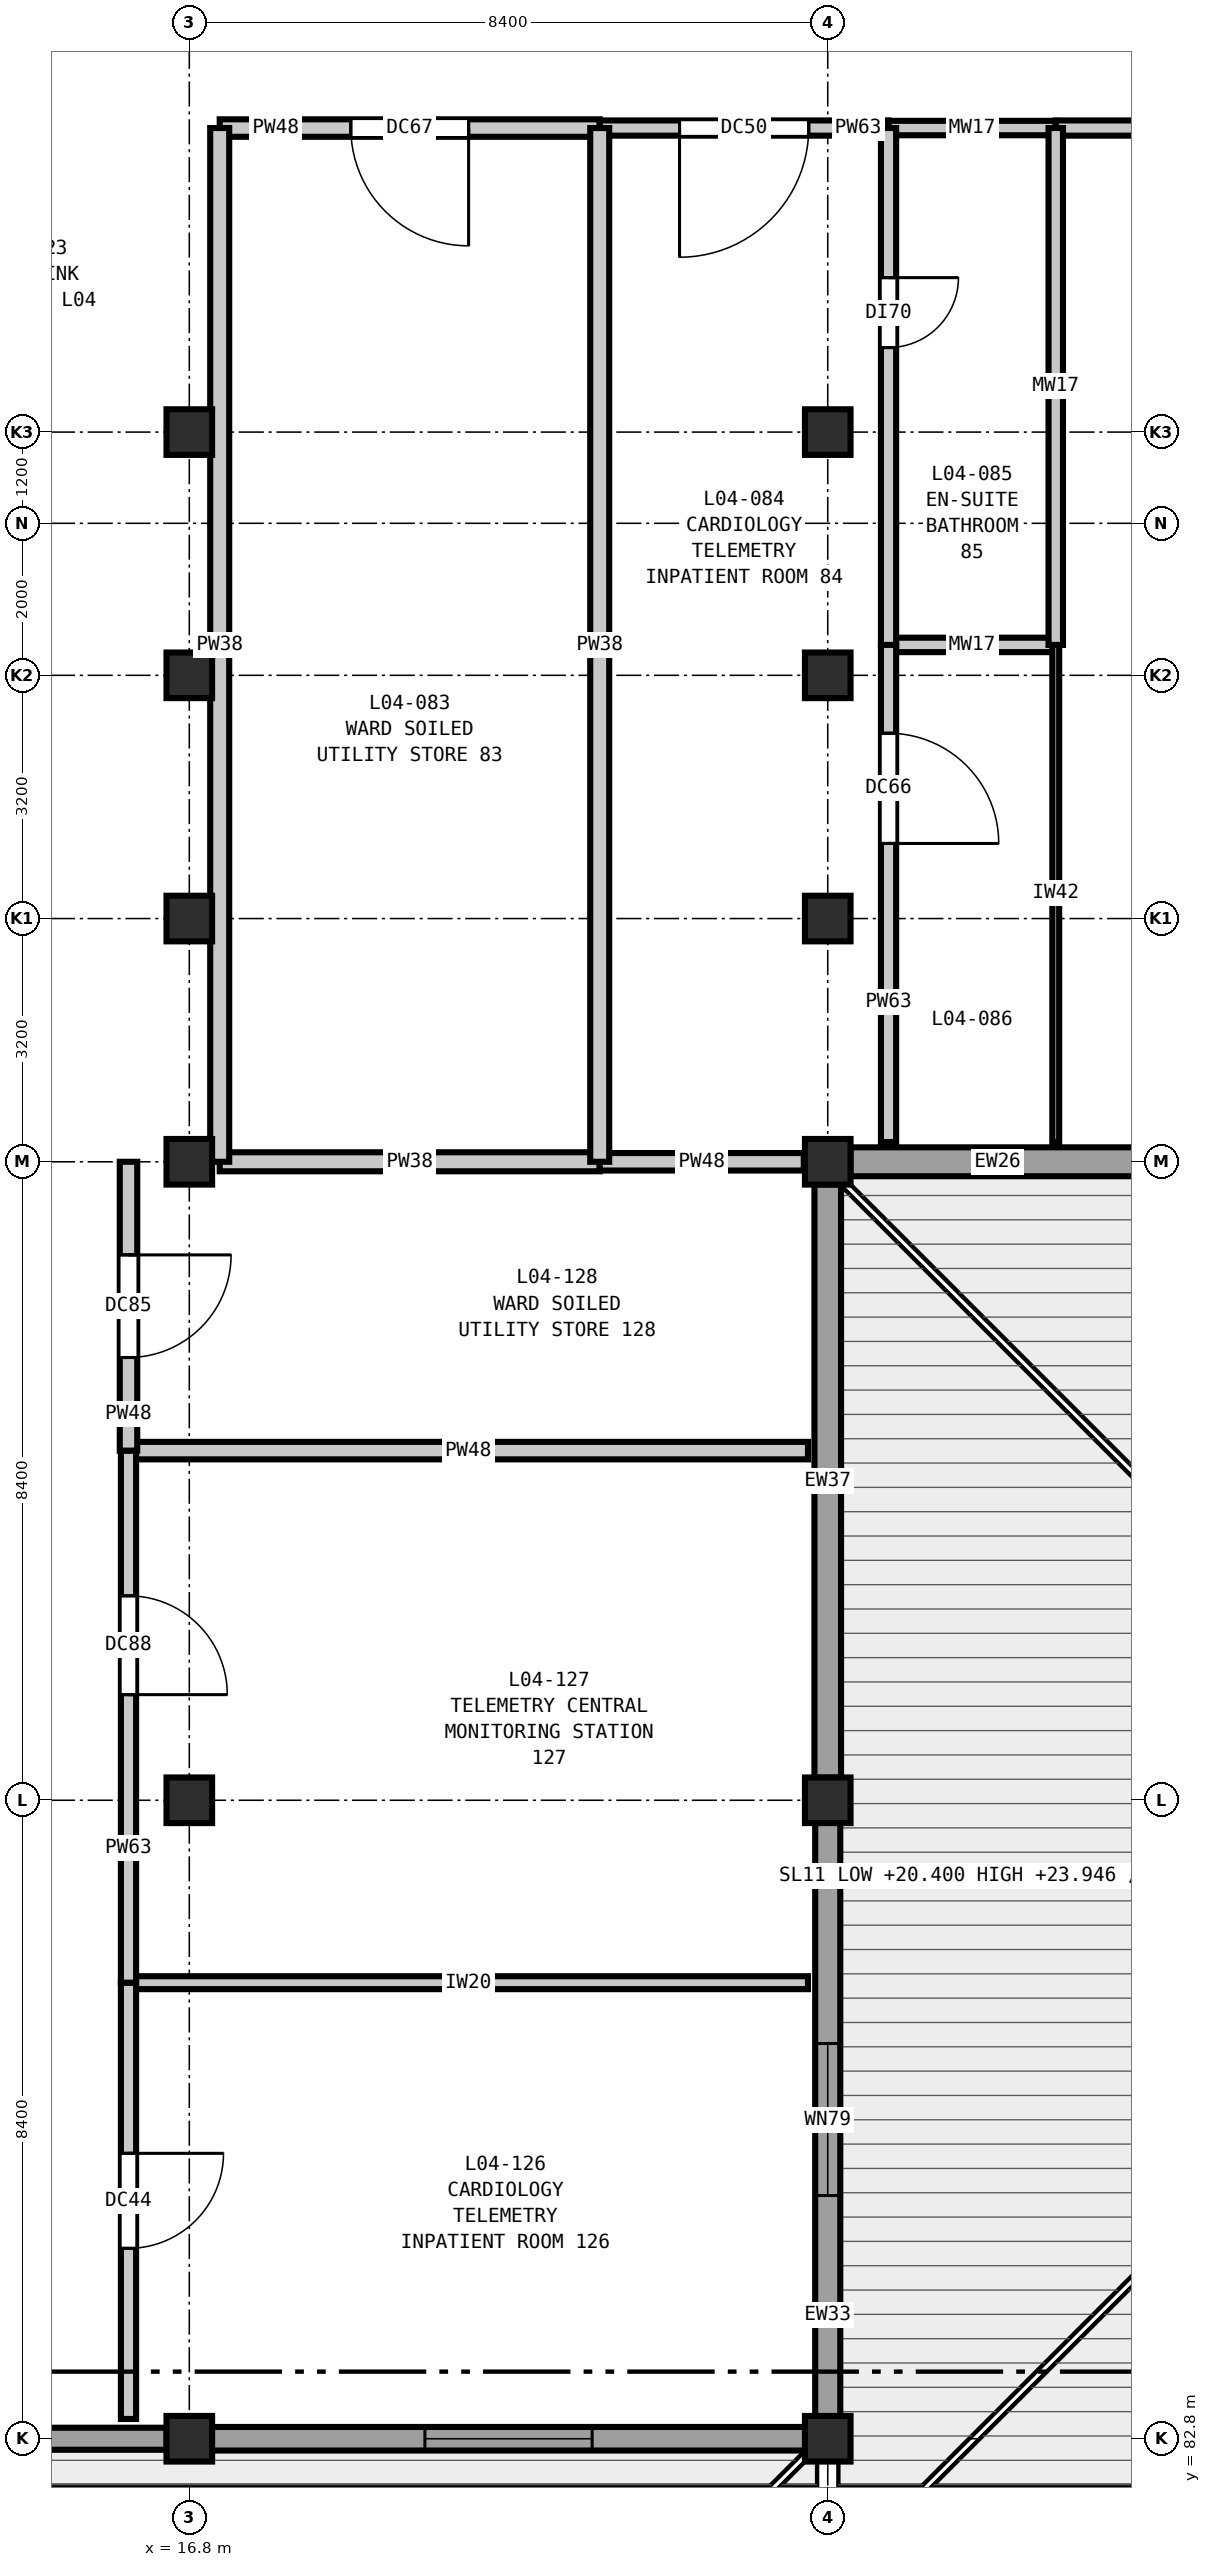
"""IFC4 building model, lengths in metres.
Left out: names, types, materials, properties, quantities, classifications, styles, units other than length and angle.
Written with IfcOpenShell. Run it as: python <this file> out.ifc"""

import sys

from ifc_helpers import new_model, si_unit, direction, frame, frame_2d, origin, origin_2d, place, context, subcontext, project, spatial, rectangle, extrude, element, fill, save


model = new_model("IFC4")
c1 = context("Model", 3, precision=1e-05, world=origin(), true_north=direction((0.0, 1.0)))
c2 = subcontext(c1, "Body", "Model", "MODEL_VIEW")
j1 = project(units=[si_unit("LENGTHUNIT", "METRE"), si_unit("PLANEANGLEUNIT", "RADIAN")], contexts=[c1])
p1 = place(None, origin())
s1 = spatial("IfcSite", under=j1, at=p1, CompositionType="ELEMENT")
p2 = place(p1, origin())
s2 = spatial("IfcBuilding", under=s1, at=p2, CompositionType="ELEMENT")
p3 = place(p2, frame((0.0, 0.0, 20.4)))
s3 = spatial("IfcBuildingStorey", under=s2, at=p3, CompositionType="ELEMENT", Elevation=20.4)
for number, where, z_axis, x_axis in (
    (1, (16.8, 82.8, 0.0), (0.0, 0.0, 1.0), (1.0, 0.0, 0.0)),
    (2, (16.8, 91.2, 0.0), (0.0, 0.0, 1.0), (1.0, 0.0, 0.0)),
    (3, (16.8, 99.6, 0.0), (0.0, 0.0, 1.0), (1.0, 0.0, 0.0)),
    (4, (16.8, 102.8, 0.0), (0.0, 0.0, 1.0), (1.0, 0.0, 0.0)),
    (5, (16.8, 106.0, 0.0), (0.0, 0.0, 1.0), (1.0, 0.0, 0.0)),
    (6, (16.8, 109.2, 0.0), (0.0, 0.0, 1.0), (1.0, 0.0, 0.0)),
    (7, (25.2, 82.8, 0.0), (0.0, 0.0, 1.0), (1.0, 0.0, 0.0)),
    (8, (25.2, 91.2, 0.0), (0.0, 0.0, 1.0), (1.0, 0.0, 0.0)),
    (9, (25.2, 99.6, 0.0), (0.0, 0.0, 1.0), (1.0, 0.0, 0.0)),
    (10, (25.2, 102.8, 0.0), (0.0, 0.0, 1.0), (1.0, 0.0, 0.0)),
    (11, (25.2, 106.0, 0.0), (0.0, 0.0, 1.0), (1.0, 0.0, 0.0)),
    (12, (25.2, 109.2, 0.0), (0.0, 0.0, 1.0), (1.0, 0.0, 0.0)),
):
    element("IfcColumn", number, at=place(p3, frame(where, z_axis=z_axis, x_axis=x_axis)), inside=s3, PredefinedType="COLUMN", context=c2, shape_type="SweptSolid", body=[
        extrude(rectangle(XDim=0.6, YDim=0.6, at=origin_2d()), origin(), (0.0, 0.0, 1.0), 4.2),
    ])
p4 = place(p3, frame((33.302, 99.6, 0.0), z_axis=(0.0, 0.0, 1.0), x_axis=(-1.0, 0.0, 0.0)))
e13 = element("IfcWall", 13, at=p4, inside=s3, PredefinedType="SOLIDWALL", context=c2, shape_type="SweptSolid", body=[
    extrude(rectangle(XDim=7.804, YDim=0.38, at=frame_2d((3.902, 0.0))), origin(), (0.0, 0.0, 1.0), 3.48),
])
p5 = place(p4, frame((1.879, 0.0, 0.9)))
e14 = element("IfcOpeningElement", 14, at=p5, cuts=e13, PredefinedType="OPENING", context=c2, shape_type="SweptSolid", body=[
    extrude(rectangle(XDim=1.8, YDim=1.95, at=frame_2d((0.9, 0.975))), frame((0.0, 0.2, 0.0), z_axis=(0.0, -1.0, 0.0), x_axis=(1.0, 0.0, 0.0)), (0.0, 0.0, 1.0), 0.4),
])
p6 = place(p3, frame((25.2, 99.302, 0.0), z_axis=(0.0, 0.0, 1.0), x_axis=(0.0, -1.0, 0.0)))
e15 = element("IfcWall", 15, at=p6, inside=s3, PredefinedType="SOLIDWALL", context=c2, shape_type="SweptSolid", body=[
    extrude(rectangle(XDim=7.804, YDim=0.35, at=frame_2d((3.902, 0.0))), origin(), (0.0, 0.0, 1.0), 3.48),
])
p7 = place(p3, frame((25.2, 90.902, 0.0), z_axis=(0.0, 0.0, 1.0), x_axis=(0.0, -1.0, 0.0)))
e16 = element("IfcWall", 16, at=p7, inside=s3, PredefinedType="SOLIDWALL", context=c2, shape_type="SweptSolid", body=[
    extrude(rectangle(XDim=7.804, YDim=0.33, at=frame_2d((3.902, 0.0))), origin(), (0.0, 0.0, 1.0), 3.48),
])
p8 = place(p7, frame((2.902, 0.0, 0.9)))
e17 = element("IfcOpeningElement", 17, at=p8, cuts=e16, PredefinedType="OPENING", context=c2, shape_type="SweptSolid", body=[
    extrude(rectangle(XDim=2.0, YDim=1.95, at=frame_2d((1.0, 0.975))), frame((0.0, 0.175, 0.0), z_axis=(0.0, -1.0, 0.0), x_axis=(1.0, 0.0, 0.0)), (0.0, 0.0, 1.0), 0.35),
])
p9 = place(p3, frame((24.902, 82.8, 0.0), z_axis=(0.0, 0.0, 1.0), x_axis=(-1.0, 0.0, 0.0)))
e18 = element("IfcWall", 18, at=p9, inside=s3, PredefinedType="SOLIDWALL", context=c2, shape_type="SweptSolid", body=[
    extrude(rectangle(XDim=7.804, YDim=0.31, at=frame_2d((3.902, 0.0))), origin(), (0.0, 0.0, 1.0), 3.48),
])
p10 = place(p9, frame((2.802, 0.0, 0.9)))
e19 = element("IfcOpeningElement", 19, at=p10, cuts=e18, PredefinedType="OPENING", context=c2, shape_type="SweptSolid", body=[
    extrude(rectangle(XDim=2.2, YDim=1.95, at=frame_2d((1.1, 0.975))), frame((0.0, 0.165, 0.0), z_axis=(0.0, -1.0, 0.0), x_axis=(1.0, 0.0, 0.0)), (0.0, 0.0, 1.0), 0.33),
])
p11 = place(p3, frame((16.502, 82.8, 0.0), z_axis=(0.0, 0.0, 1.0), x_axis=(-1.0, 0.0, 0.0)))
e20 = element("IfcWall", 20, at=p11, inside=s3, PredefinedType="SOLIDWALL", context=c2, shape_type="SweptSolid", body=[
    extrude(rectangle(XDim=7.804, YDim=0.29, at=frame_2d((3.902, 0.0))), origin(), (0.0, 0.0, 1.0), 3.48),
])
p12 = place(p3, frame((16.0, 88.8, 0.0), z_axis=(0.0, 0.0, 1.0), x_axis=(1.0, 0.0, 0.0)))
e21 = element("IfcWall", 21, at=p12, inside=s3, PredefinedType="PARTITIONING", context=c2, shape_type="SweptSolid", body=[
    extrude(rectangle(XDim=8.94, YDim=0.17, at=frame_2d((4.47, 0.0))), origin(), (0.0, 0.0, 1.0), 3.82),
])
p13 = place(p3, frame((16.0, 95.8, 0.0), z_axis=(0.0, 0.0, 1.0), x_axis=(1.0, 0.0, 0.0)))
e22 = element("IfcWall", 22, at=p13, inside=s3, PredefinedType="PARTITIONING", context=c2, shape_type="SweptSolid", body=[
    extrude(rectangle(XDim=8.94, YDim=0.23, at=frame_2d((4.47, 0.0))), origin(), (0.0, 0.0, 1.0), 3.82),
])
p14 = place(p3, frame((17.2, 99.6, 0.0), z_axis=(0.0, 0.0, 1.0), x_axis=(1.0, 0.0, 0.0)))
e23 = element("IfcWall", 23, at=p14, inside=s3, PredefinedType="PARTITIONING", context=c2, shape_type="SweptSolid", body=[
    extrude(rectangle(XDim=5.0, YDim=0.25, at=frame_2d((2.5, 0.0))), origin(), (0.0, 0.0, 1.0), 3.585),
])
p15 = place(p3, frame((22.2, 99.6, 0.0), z_axis=(0.0, 0.0, 1.0), x_axis=(1.0, 0.0, 0.0)))
e24 = element("IfcWall", 24, at=p15, inside=s3, PredefinedType="PARTITIONING", context=c2, shape_type="SweptSolid", body=[
    extrude(rectangle(XDim=2.685, YDim=0.23, at=frame_2d((1.343, 0.0))), origin(), (0.0, 0.0, 1.0), 3.585),
])
p16 = place(p3, frame((26.0, 106.4, 0.0), z_axis=(0.0, 0.0, 1.0), x_axis=(1.0, 0.0, 0.0)))
e25 = element("IfcWall", 25, at=p16, inside=s3, PredefinedType="PLUMBINGWALL", context=c2, shape_type="SweptSolid", body=[
    extrude(rectangle(XDim=2.2, YDim=0.19, at=frame_2d((1.1, 0.0))), origin(), (0.0, 0.0, 1.0), 3.82),
])
p17 = place(p3, frame((17.2, 113.2, 0.0), z_axis=(0.0, 0.0, 1.0), x_axis=(1.0, 0.0, 0.0)))
e26 = element("IfcWall", 26, at=p17, inside=s3, PredefinedType="PARTITIONING", context=c2, shape_type="SweptSolid", body=[
    extrude(rectangle(XDim=5.0, YDim=0.23, at=frame_2d((2.5, 0.0))), origin(), (0.0, 0.0, 1.0), 3.82),
])
p18 = place(p17, frame((1.725, 0.0, 0.0)))
e27 = element("IfcOpeningElement", 27, at=p18, cuts=e26, PredefinedType="OPENING", context=c2, shape_type="SweptSolid", body=[
    extrude(rectangle(XDim=1.55, YDim=2.25, at=frame_2d((0.775, 1.125))), frame((0.0, 0.125, 0.0), z_axis=(0.0, -1.0, 0.0), x_axis=(1.0, 0.0, 0.0)), (0.0, 0.0, 1.0), 0.25),
])
p19 = place(p3, frame((22.2, 113.2, 0.0), z_axis=(0.0, 0.0, 1.0), x_axis=(1.0, 0.0, 0.0)))
e28 = element("IfcWall", 28, at=p19, inside=s3, PredefinedType="PARTITIONING", context=c2, shape_type="SweptSolid", body=[
    extrude(rectangle(XDim=3.8, YDim=0.2, at=frame_2d((1.9, 0.0))), origin(), (0.0, 0.0, 1.0), 3.82),
])
p20 = place(p19, frame((1.05, 0.0, 0.0)))
e29 = element("IfcOpeningElement", 29, at=p20, cuts=e28, PredefinedType="OPENING", context=c2, shape_type="SweptSolid", body=[
    extrude(rectangle(XDim=1.7, YDim=2.3, at=frame_2d((0.85, 1.15))), frame((0.0, 0.11, 0.0), z_axis=(0.0, -1.0, 0.0), x_axis=(1.0, 0.0, 0.0)), (0.0, 0.0, 1.0), 0.22),
])
p21 = place(p3, frame((26.0, 113.2, 0.0), z_axis=(0.0, 0.0, 1.0), x_axis=(1.0, 0.0, 0.0)))
e30 = element("IfcWall", 30, at=p21, inside=s3, PredefinedType="PLUMBINGWALL", context=c2, shape_type="SweptSolid", body=[
    extrude(rectangle(XDim=2.2, YDim=0.19, at=frame_2d((1.1, 0.0))), origin(), (0.0, 0.0, 1.0), 3.82),
])
p22 = place(p3, frame((28.2, 113.2, 0.0), z_axis=(0.0, 0.0, 1.0), x_axis=(1.0, 0.0, 0.0)))
e31 = element("IfcWall", 31, at=p22, inside=s3, PredefinedType="PARTITIONING", context=c2, shape_type="SweptSolid", body=[
    extrude(rectangle(XDim=7.0, YDim=0.2, at=frame_2d((3.5, 0.0))), origin(), (0.0, 0.0, 1.0), 3.82),
])
p23 = place(p22, frame((2.575, 0.0, 0.0)))
e32 = element("IfcOpeningElement", 32, at=p23, cuts=e31, PredefinedType="OPENING", context=c2, shape_type="SweptSolid", body=[
    extrude(rectangle(XDim=1.85, YDim=2.3, at=frame_2d((0.925, 1.15))), frame((0.0, 0.11, 0.0), z_axis=(0.0, -1.0, 0.0), x_axis=(1.0, 0.0, 0.0)), (0.0, 0.0, 1.0), 0.22),
])
p24 = place(p3, frame((16.0, 83.06, 0.0), z_axis=(0.0, 0.0, 1.0), x_axis=(0.0, 1.0, 0.0)))
e33 = element("IfcWall", 33, at=p24, inside=s3, PredefinedType="PARTITIONING", context=c2, shape_type="SweptSolid", body=[
    extrude(rectangle(XDim=5.74, YDim=0.2, at=frame_2d((2.87, 0.0))), origin(), (0.0, 0.0, 1.0), 3.82),
])
p25 = place(p24, frame((2.245, 0.0, 0.0)))
e34 = element("IfcOpeningElement", 34, at=p25, cuts=e33, PredefinedType="OPENING", context=c2, shape_type="SweptSolid", body=[
    extrude(rectangle(XDim=1.25, YDim=2.15, at=frame_2d((0.625, 1.075))), frame((0.0, 0.11, 0.0), z_axis=(0.0, -1.0, 0.0), x_axis=(1.0, 0.0, 0.0)), (0.0, 0.0, 1.0), 0.22),
])
p26 = place(p3, frame((16.0, 88.8, 0.0), z_axis=(0.0, 0.0, 1.0), x_axis=(0.0, 1.0, 0.0)))
e35 = element("IfcWall", 35, at=p26, inside=s3, PredefinedType="PARTITIONING", context=c2, shape_type="SweptSolid", body=[
    extrude(rectangle(XDim=7.0, YDim=0.2, at=frame_2d((3.5, 0.0))), origin(), (0.0, 0.0, 1.0), 3.82),
])
p27 = place(p26, frame((3.79, 0.0, 0.0)))
e36 = element("IfcOpeningElement", 36, at=p27, cuts=e35, PredefinedType="OPENING", context=c2, shape_type="SweptSolid", body=[
    extrude(rectangle(XDim=1.3, YDim=2.2, at=frame_2d((0.65, 1.1))), frame((0.0, 0.11, 0.0), z_axis=(0.0, -1.0, 0.0), x_axis=(1.0, 0.0, 0.0)), (0.0, 0.0, 1.0), 0.22),
])
p28 = place(p3, frame((16.0, 95.8, 0.0), z_axis=(0.0, 0.0, 1.0), x_axis=(0.0, 1.0, 0.0)))
e37 = element("IfcWall", 37, at=p28, inside=s3, PredefinedType="PARTITIONING", context=c2, shape_type="SweptSolid", body=[
    extrude(rectangle(XDim=3.8, YDim=0.23, at=frame_2d((1.9, 0.0))), origin(), (0.0, 0.0, 1.0), 3.82),
])
p29 = place(p28, frame((1.225, 0.0, 0.0)))
e38 = element("IfcOpeningElement", 38, at=p29, cuts=e37, PredefinedType="OPENING", context=c2, shape_type="SweptSolid", body=[
    extrude(rectangle(XDim=1.35, YDim=2.2, at=frame_2d((0.675, 1.1))), frame((0.0, 0.125, 0.0), z_axis=(0.0, -1.0, 0.0), x_axis=(1.0, 0.0, 0.0)), (0.0, 0.0, 1.0), 0.25),
])
for number, where, z_axis, x_axis in (
    (39, (17.2, 99.6, 0.0), (0.0, 0.0, 1.0), (0.0, 1.0, 0.0)),
    (40, (22.2, 99.6, 0.0), (0.0, 0.0, 1.0), (0.0, 1.0, 0.0)),
):
    element("IfcWall", number, at=place(p3, frame(where, z_axis=z_axis, x_axis=x_axis)), inside=s3, PredefinedType="PARTITIONING", context=c2, shape_type="SweptSolid", body=[
        extrude(rectangle(XDim=13.6, YDim=0.25, at=frame_2d((6.8, 0.0))), origin(), (0.0, 0.0, 1.0), 3.82),
    ])
p30 = place(p3, frame((26.0, 99.86, 0.0), z_axis=(0.0, 0.0, 1.0), x_axis=(0.0, 1.0, 0.0)))
e41 = element("IfcWall", 41, at=p30, inside=s3, PredefinedType="PARTITIONING", context=c2, shape_type="SweptSolid", body=[
    extrude(rectangle(XDim=6.54, YDim=0.2, at=frame_2d((3.27, 0.0))), origin(), (0.0, 0.0, 1.0), 3.82),
])
p31 = place(p30, frame((3.928, 0.0, 0.0)))
e42 = element("IfcOpeningElement", 42, at=p31, cuts=e41, PredefinedType="OPENING", context=c2, shape_type="SweptSolid", body=[
    extrude(rectangle(XDim=1.45, YDim=2.25, at=frame_2d((0.725, 1.125))), frame((0.0, 0.11, 0.0), z_axis=(0.0, -1.0, 0.0), x_axis=(1.0, 0.0, 0.0)), (0.0, 0.0, 1.0), 0.22),
])
p32 = place(p3, frame((26.0, 106.4, 0.0), z_axis=(0.0, 0.0, 1.0), x_axis=(0.0, 1.0, 0.0)))
e43 = element("IfcWall", 43, at=p32, inside=s3, PredefinedType="PARTITIONING", context=c2, shape_type="SweptSolid", body=[
    extrude(rectangle(XDim=6.8, YDim=0.2, at=frame_2d((3.4, 0.0))), origin(), (0.0, 0.0, 1.0), 3.82),
])
p33 = place(p32, frame((3.912, 0.0, 0.0)))
e44 = element("IfcOpeningElement", 44, at=p33, cuts=e43, PredefinedType="OPENING", context=c2, shape_type="SweptSolid", body=[
    extrude(rectangle(XDim=0.92, YDim=2.1, at=frame_2d((0.46, 1.05))), frame((0.0, 0.11, 0.0), z_axis=(0.0, -1.0, 0.0), x_axis=(1.0, 0.0, 0.0)), (0.0, 0.0, 1.0), 0.22),
])
p34 = place(p3, frame((28.2, 99.86, 0.0), z_axis=(0.0, 0.0, 1.0), x_axis=(0.0, 1.0, 0.0)))
e45 = element("IfcWall", 45, at=p34, inside=s3, PredefinedType="PARTITIONING", context=c2, shape_type="SweptSolid", body=[
    extrude(rectangle(XDim=6.54, YDim=0.09, at=frame_2d((3.27, 0.0))), origin(), (0.0, 0.0, 1.0), 3.82),
])
p35 = place(p3, frame((28.2, 106.4, 0.0), z_axis=(0.0, 0.0, 1.0), x_axis=(0.0, 1.0, 0.0)))
e46 = element("IfcWall", 46, at=p35, inside=s3, PredefinedType="PLUMBINGWALL", context=c2, shape_type="SweptSolid", body=[
    extrude(rectangle(XDim=6.8, YDim=0.19, at=frame_2d((3.4, 0.0))), origin(), (0.0, 0.0, 1.0), 3.82),
])
p36 = place(p8, origin())
e47 = element("IfcWindow", 47, at=p36, inside=s3, PartitioningType="DOUBLE_PANEL_VERTICAL", PredefinedType="WINDOW", context=c2, shape_type="SweptSolid", body=[
    extrude(rectangle(XDim=2.0, YDim=1.95, at=frame_2d((1.0, 0.975))), frame((0.0, 0.03, 0.0), z_axis=(0.0, -1.0, 0.0), x_axis=(1.0, 0.0, 0.0)), (0.0, 0.0, 1.0), 0.06),
])
fill(e17, e47)
p37 = place(p10, origin())
e48 = element("IfcWindow", 48, at=p37, inside=s3, PartitioningType="DOUBLE_PANEL_VERTICAL", PredefinedType="WINDOW", context=c2, shape_type="SweptSolid", body=[
    extrude(rectangle(XDim=2.2, YDim=1.95, at=frame_2d((1.1, 0.975))), frame((0.0, 0.03, 0.0), z_axis=(0.0, -1.0, 0.0), x_axis=(1.0, 0.0, 0.0)), (0.0, 0.0, 1.0), 0.06),
])
fill(e19, e48)
p38 = place(p18, frame((1.55, 0.0, 0.0), z_axis=(0.0, 0.0, 1.0), x_axis=(-1.0, 0.0, 0.0)))
e49 = element("IfcDoor", 49, at=p38, inside=s3, OperationType="SINGLE_SWING_LEFT", PredefinedType="DOOR", context=c2, shape_type="SweptSolid", body=[
    extrude(rectangle(XDim=1.55, YDim=2.25, at=frame_2d((0.775, 1.125))), frame((0.0, 0.025, 0.0), z_axis=(0.0, -1.0, 0.0), x_axis=(1.0, 0.0, 0.0)), (0.0, 0.0, 1.0), 0.05),
])
fill(e27, e49)
p39 = place(p20, frame((1.7, 0.0, 0.0), z_axis=(0.0, 0.0, 1.0), x_axis=(-1.0, 0.0, 0.0)))
e50 = element("IfcDoor", 50, at=p39, inside=s3, OperationType="SINGLE_SWING_RIGHT", PredefinedType="DOOR", context=c2, shape_type="SweptSolid", body=[
    extrude(rectangle(XDim=1.7, YDim=2.3, at=frame_2d((0.85, 1.15))), frame((0.0, 0.025, 0.0), z_axis=(0.0, -1.0, 0.0), x_axis=(1.0, 0.0, 0.0)), (0.0, 0.0, 1.0), 0.05),
])
fill(e29, e50)
p40 = place(p25, frame((1.25, 0.0, 0.0), z_axis=(0.0, 0.0, 1.0), x_axis=(-1.0, 0.0, 0.0)))
e51 = element("IfcDoor", 51, at=p40, inside=s3, OperationType="SINGLE_SWING_LEFT", PredefinedType="DOOR", context=c2, shape_type="SweptSolid", body=[
    extrude(rectangle(XDim=1.25, YDim=2.15, at=frame_2d((0.625, 1.075))), frame((0.0, 0.025, 0.0), z_axis=(0.0, -1.0, 0.0), x_axis=(1.0, 0.0, 0.0)), (0.0, 0.0, 1.0), 0.05),
])
fill(e34, e51)
p41 = place(p27, frame((1.3, 0.0, 0.0), z_axis=(0.0, 0.0, 1.0), x_axis=(-1.0, 0.0, 0.0)))
e52 = element("IfcDoor", 52, at=p41, inside=s3, OperationType="SINGLE_SWING_RIGHT", PredefinedType="DOOR", context=c2, shape_type="SweptSolid", body=[
    extrude(rectangle(XDim=1.3, YDim=2.2, at=frame_2d((0.65, 1.1))), frame((0.0, 0.025, 0.0), z_axis=(0.0, -1.0, 0.0), x_axis=(1.0, 0.0, 0.0)), (0.0, 0.0, 1.0), 0.05),
])
fill(e36, e52)
p42 = place(p29, frame((1.35, 0.0, 0.0), z_axis=(0.0, 0.0, 1.0), x_axis=(-1.0, 0.0, 0.0)))
e53 = element("IfcDoor", 53, at=p42, inside=s3, OperationType="SINGLE_SWING_LEFT", PredefinedType="DOOR", context=c2, shape_type="SweptSolid", body=[
    extrude(rectangle(XDim=1.35, YDim=2.2, at=frame_2d((0.675, 1.1))), frame((0.0, 0.025, 0.0), z_axis=(0.0, -1.0, 0.0), x_axis=(1.0, 0.0, 0.0)), (0.0, 0.0, 1.0), 0.05),
])
fill(e38, e53)
p43 = place(p31, frame((1.45, 0.0, 0.0), z_axis=(0.0, 0.0, 1.0), x_axis=(-1.0, 0.0, 0.0)))
e54 = element("IfcDoor", 54, at=p43, inside=s3, OperationType="SINGLE_SWING_RIGHT", PredefinedType="DOOR", context=c2, shape_type="SweptSolid", body=[
    extrude(rectangle(XDim=1.45, YDim=2.25, at=frame_2d((0.725, 1.125))), frame((0.0, 0.025, 0.0), z_axis=(0.0, -1.0, 0.0), x_axis=(1.0, 0.0, 0.0)), (0.0, 0.0, 1.0), 0.05),
])
fill(e42, e54)
p44 = place(p33, frame((0.92, 0.0, 0.0), z_axis=(0.0, 0.0, 1.0), x_axis=(-1.0, 0.0, 0.0)))
e55 = element("IfcDoor", 55, at=p44, inside=s3, OperationType="SINGLE_SWING_LEFT", PredefinedType="DOOR", context=c2, shape_type="SweptSolid", body=[
    extrude(rectangle(XDim=0.92, YDim=2.1, at=frame_2d((0.46, 1.05))), frame((0.0, 0.025, 0.0), z_axis=(0.0, -1.0, 0.0), x_axis=(1.0, 0.0, 0.0)), (0.0, 0.0, 1.0), 0.05),
])
fill(e44, e55)
save(model, sys.argv[1])
